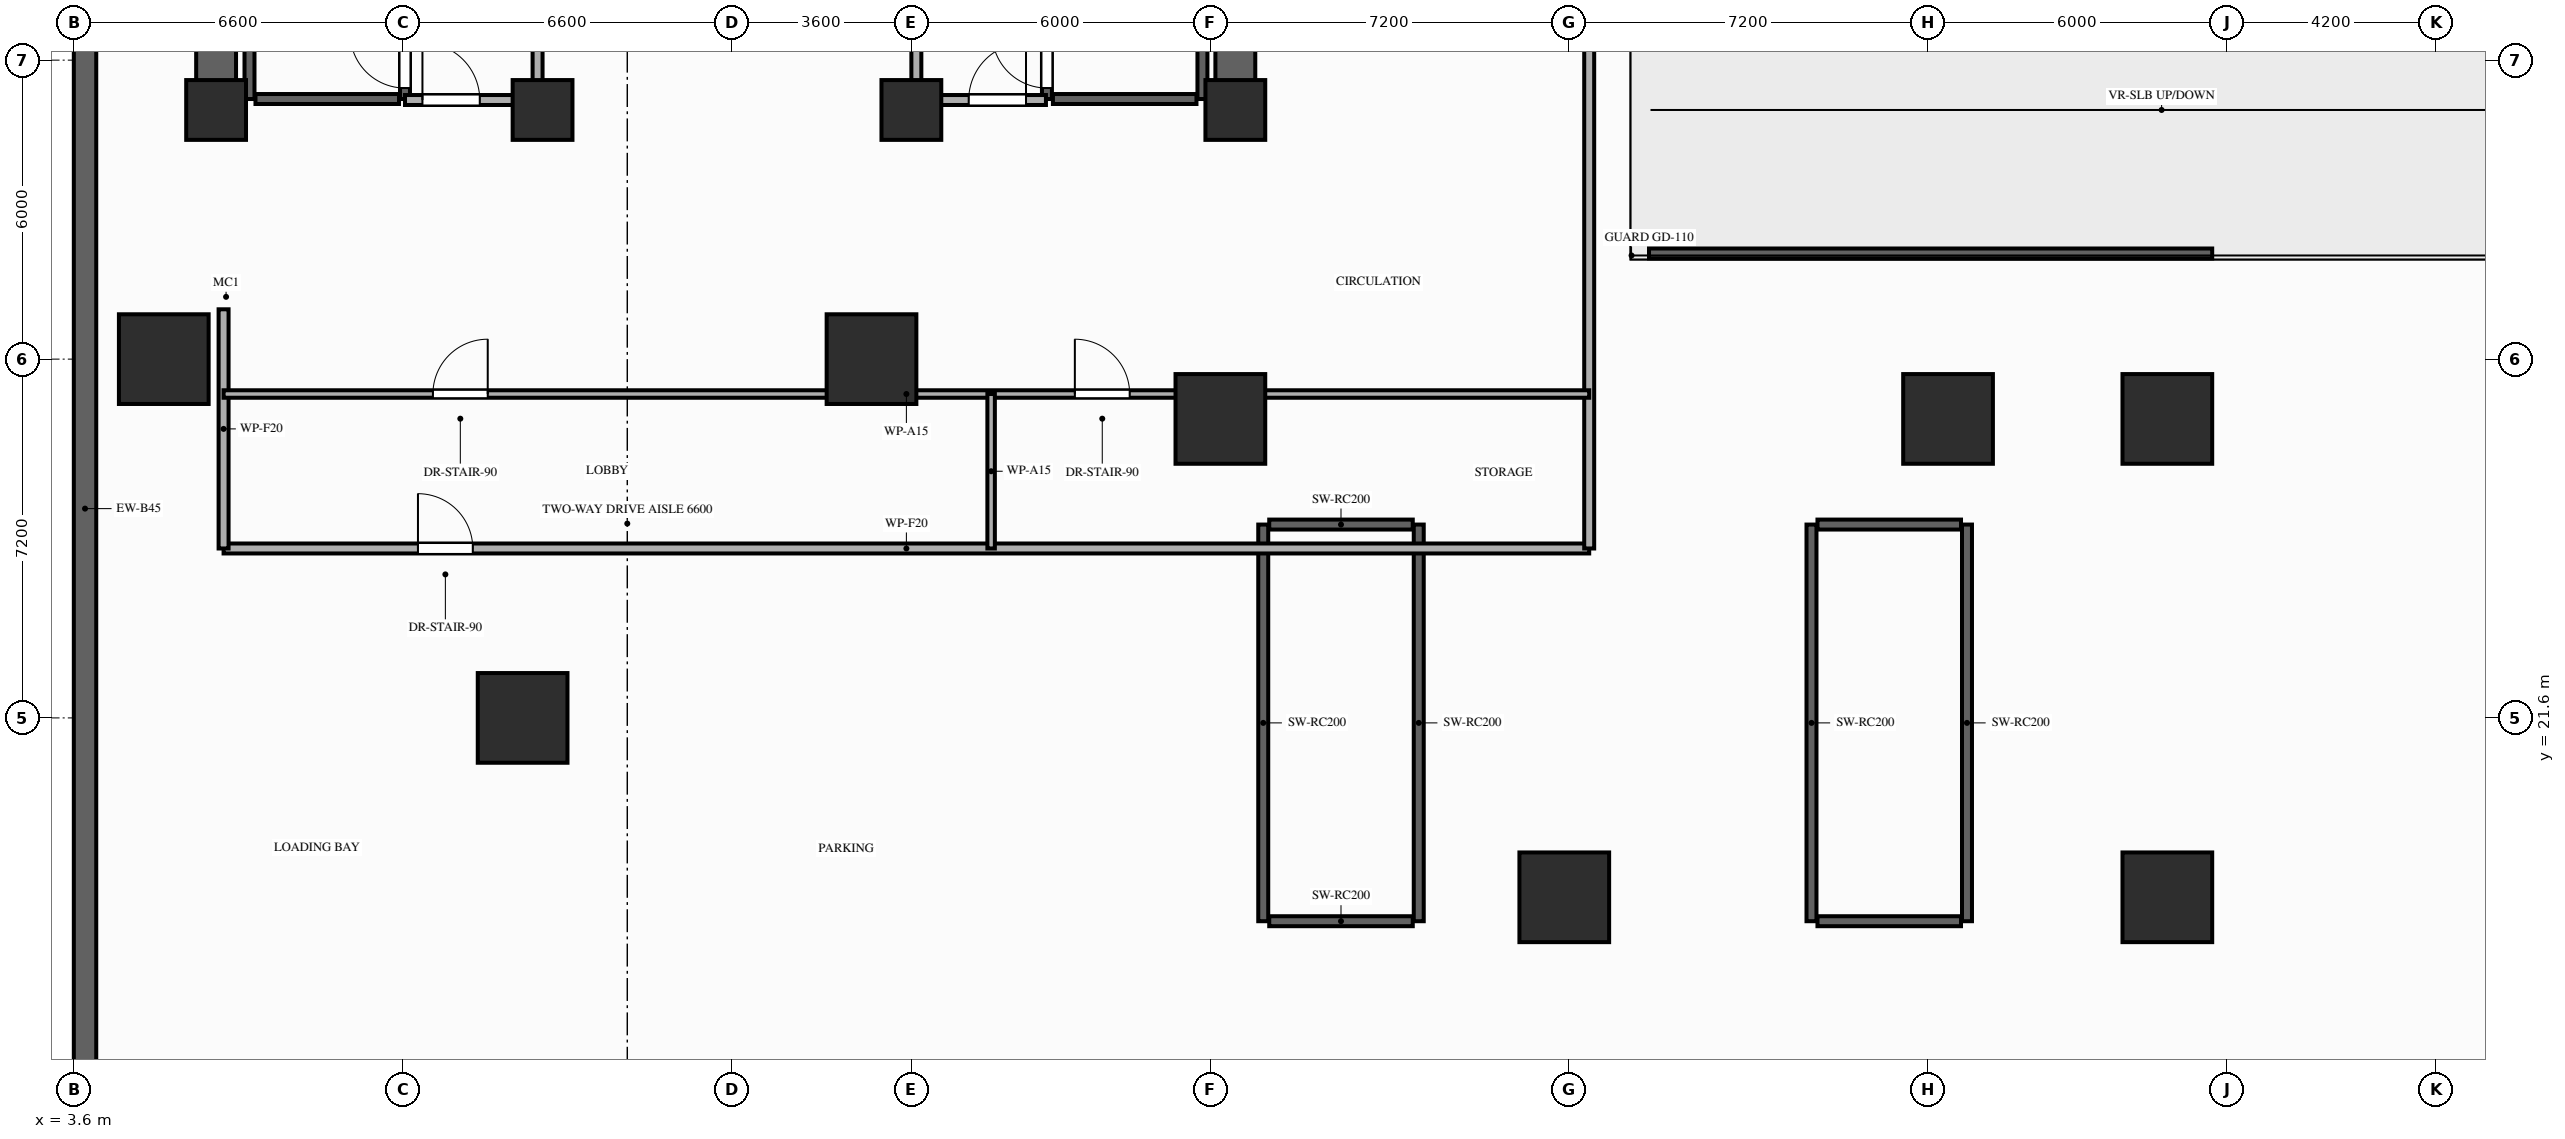
"""IFC4 building model, lengths in metres.
Left out: names, types, materials, properties, quantities, classifications, styles, units other than length and angle.
Written with IfcOpenShell. Run it as: python <this file> out.ifc"""

import sys

from ifc_helpers import new_model, si_unit, direction, frame, frame_2d, origin, origin_2d, place, context, subcontext, project, spatial, rectangle, extrude, element, fill, save


model = new_model("IFC4")
c1 = context("Model", 3, precision=1e-05, world=origin(), true_north=direction((0.0, 1.0)))
c2 = subcontext(c1, "Body", "Model", "MODEL_VIEW")
j1 = project(units=[si_unit("LENGTHUNIT", "METRE"), si_unit("PLANEANGLEUNIT", "RADIAN")], contexts=[c1])
p1 = place(None, origin())
s1 = spatial("IfcSite", under=j1, at=p1, CompositionType="ELEMENT")
p2 = place(p1, origin())
s2 = spatial("IfcBuilding", under=s1, at=p2, CompositionType="ELEMENT")
p3 = place(p2, frame((0.0, 0.0, -7.6)))
s3 = spatial("IfcBuildingStorey", under=s2, at=p3, CompositionType="ELEMENT", Elevation=-7.6)
for number, where, z_axis, x_axis in (
    (1, (6.45, 33.8, 0.0), (0.0, 0.0, 1.0), (1.0, 0.0, 0.0)),
    (2, (13.0, 33.8, 0.0), (0.0, 0.0, 1.0), (1.0, 0.0, 0.0)),
    (3, (20.4, 33.8, 0.0), (0.0, 0.0, 1.0), (1.0, 0.0, 0.0)),
    (4, (26.9, 33.8, 0.0), (0.0, 0.0, 1.0), (1.0, 0.0, 0.0)),
):
    element("IfcColumn", number, at=place(p3, frame(where, z_axis=z_axis, x_axis=x_axis)), inside=s3, PredefinedType="COLUMN", context=c2, shape_type="SweptSolid", body=[
        extrude(rectangle(XDim=1.2, YDim=1.2, at=origin_2d()), origin(), (0.0, 0.0, 1.0), 3.8),
    ])
for number, where, z_axis, x_axis in (
    (5, (5.4, 28.8, 0.0), (0.0, 0.0, 1.0), (1.0, 0.0, 0.0)),
    (6, (19.6, 28.8, 0.0), (0.0, 0.0, 1.0), (1.0, 0.0, 0.0)),
    (7, (26.6, 27.6, 0.0), (0.0, 0.0, 1.0), (1.0, 0.0, 0.0)),
    (8, (41.2, 27.6, 0.0), (0.0, 0.0, 1.0), (1.0, 0.0, 0.0)),
    (9, (45.6, 27.6, 0.0), (0.0, 0.0, 1.0), (1.0, 0.0, 0.0)),
    (10, (12.6, 21.6, 0.0), (0.0, 0.0, 1.0), (1.0, 0.0, 0.0)),
    (11, (33.5, 18.0, 0.0), (0.0, 0.0, 1.0), (1.0, 0.0, 0.0)),
    (12, (45.6, 18.0, 0.0), (0.0, 0.0, 1.0), (1.0, 0.0, 0.0)),
):
    element("IfcColumn", number, at=place(p3, frame(where, z_axis=z_axis, x_axis=x_axis)), inside=s3, PredefinedType="COLUMN", context=c2, shape_type="SweptSolid", body=[
        extrude(rectangle(XDim=1.8, YDim=1.8, at=origin_2d()), origin(), (0.0, 0.0, 1.0), 3.8),
    ])
p4 = place(p3, frame((3.82, 49.9, 0.0), z_axis=(0.0, 0.0, 1.0), x_axis=(0.0, -1.0, 0.0)))
e13 = element("IfcWall", 13, at=p4, inside=s3, PredefinedType="SOLIDWALL", context=c2, shape_type="SweptSolid", body=[
    extrude(rectangle(XDim=48.2, YDim=0.45, at=frame_2d((24.1, 0.0))), origin(), (0.0, 0.0, 1.0), 3.55),
])
for number, where, z_axis, x_axis in (
    (14, (6.45, 33.8, 0.0), (0.0, 0.0, 1.0), (0.0, 1.0, 0.0)),
    (15, (26.9, 33.8, 0.0), (0.0, 0.0, 1.0), (0.0, 1.0, 0.0)),
):
    element("IfcWall", number, at=place(p3, frame(where, z_axis=z_axis, x_axis=x_axis)), inside=s3, PredefinedType="SHEAR", context=c2, shape_type="SweptSolid", body=[
        extrude(rectangle(XDim=7.95, YDim=0.8, at=frame_2d((3.975, 0.0))), origin(), (0.0, 0.0, 1.0), 3.55),
    ])
p5 = place(p3, frame((7.12, 34.02, 0.0), z_axis=(0.0, 0.0, 1.0), x_axis=(0.0, 1.0, 0.0)))
e16 = element("IfcWall", 16, at=p5, inside=s3, PredefinedType="SHEAR", context=c2, shape_type="SweptSolid", body=[
    extrude(rectangle(XDim=7.78, YDim=0.2, at=frame_2d((3.89, 0.0))), origin(), (0.0, 0.0, 1.0), 3.55),
])
p6 = place(p3, frame((10.24, 34.02, 0.0), z_axis=(0.0, 0.0, 1.0), x_axis=(0.0, 1.0, 0.0)))
e17 = element("IfcWall", 17, at=p6, inside=s3, PredefinedType="SHEAR", context=c2, shape_type="SweptSolid", body=[
    extrude(rectangle(XDim=7.78, YDim=0.2, at=frame_2d((3.89, 0.0))), origin(), (0.0, 0.0, 1.0), 3.55),
])
p7 = place(p6, frame((0.22, 0.0, 0.0)))
e18 = element("IfcOpeningElement", 18, at=p7, cuts=e17, PredefinedType="OPENING", context=c2, shape_type="SweptSolid", body=[
    extrude(rectangle(XDim=1.1, YDim=2.15, at=frame_2d((0.55, 1.075))), frame((0.0, 0.11, 0.0), z_axis=(0.0, -1.0, 0.0), x_axis=(1.0, 0.0, 0.0)), (0.0, 0.0, 1.0), 0.22),
])
p8 = place(p3, frame((7.24, 34.02, 0.0), z_axis=(0.0, 0.0, 1.0), x_axis=(1.0, 0.0, 0.0)))
e19 = element("IfcWall", 19, at=p8, inside=s3, PredefinedType="SHEAR", context=c2, shape_type="SweptSolid", body=[
    extrude(rectangle(XDim=2.88, YDim=0.2, at=frame_2d((1.44, 0.0))), origin(), (0.0, 0.0, 1.0), 3.55),
])
p9 = place(p3, frame((23.12, 34.02, 0.0), z_axis=(0.0, 0.0, 1.0), x_axis=(0.0, 1.0, 0.0)))
e20 = element("IfcWall", 20, at=p9, inside=s3, PredefinedType="SHEAR", context=c2, shape_type="SweptSolid", body=[
    extrude(rectangle(XDim=7.78, YDim=0.2, at=frame_2d((3.89, 0.0))), origin(), (0.0, 0.0, 1.0), 3.55),
])
p10 = place(p9, frame((0.22, 0.0, 0.0)))
e21 = element("IfcOpeningElement", 21, at=p10, cuts=e20, PredefinedType="OPENING", context=c2, shape_type="SweptSolid", body=[
    extrude(rectangle(XDim=1.1, YDim=2.15, at=frame_2d((0.55, 1.075))), frame((0.0, 0.11, 0.0), z_axis=(0.0, -1.0, 0.0), x_axis=(1.0, 0.0, 0.0)), (0.0, 0.0, 1.0), 0.22),
])
p11 = place(p3, frame((26.24, 34.02, 0.0), z_axis=(0.0, 0.0, 1.0), x_axis=(0.0, 1.0, 0.0)))
e22 = element("IfcWall", 22, at=p11, inside=s3, PredefinedType="SHEAR", context=c2, shape_type="SweptSolid", body=[
    extrude(rectangle(XDim=7.78, YDim=0.2, at=frame_2d((3.89, 0.0))), origin(), (0.0, 0.0, 1.0), 3.55),
])
p12 = place(p3, frame((23.24, 34.02, 0.0), z_axis=(0.0, 0.0, 1.0), x_axis=(1.0, 0.0, 0.0)))
e23 = element("IfcWall", 23, at=p12, inside=s3, PredefinedType="SHEAR", context=c2, shape_type="SweptSolid", body=[
    extrude(rectangle(XDim=2.88, YDim=0.2, at=frame_2d((1.44, 0.0))), origin(), (0.0, 0.0, 1.0), 3.55),
])
for number, where, z_axis, x_axis in (
    (24, (27.46, 17.52, 0.0), (0.0, 0.0, 1.0), (0.0, 1.0, 0.0)),
    (25, (30.58, 17.52, 0.0), (0.0, 0.0, 1.0), (0.0, 1.0, 0.0)),
):
    element("IfcWall", number, at=place(p3, frame(where, z_axis=z_axis, x_axis=x_axis)), inside=s3, PredefinedType="SHEAR", context=c2, shape_type="SweptSolid", body=[
        extrude(rectangle(XDim=7.96, YDim=0.2, at=frame_2d((3.98, 0.0))), origin(), (0.0, 0.0, 1.0), 3.55),
    ])
for number, where, z_axis, x_axis in (
    (26, (27.58, 25.48, 0.0), (0.0, 0.0, 1.0), (1.0, 0.0, 0.0)),
    (27, (27.58, 17.52, 0.0), (0.0, 0.0, 1.0), (1.0, 0.0, 0.0)),
):
    element("IfcWall", number, at=place(p3, frame(where, z_axis=z_axis, x_axis=x_axis)), inside=s3, PredefinedType="SHEAR", context=c2, shape_type="SweptSolid", body=[
        extrude(rectangle(XDim=2.88, YDim=0.2, at=frame_2d((1.44, 0.0))), origin(), (0.0, 0.0, 1.0), 3.55),
    ])
for number, where, z_axis, x_axis in (
    (28, (38.46, 17.52, 0.0), (0.0, 0.0, 1.0), (0.0, 1.0, 0.0)),
    (29, (41.58, 17.52, 0.0), (0.0, 0.0, 1.0), (0.0, 1.0, 0.0)),
):
    element("IfcWall", number, at=place(p3, frame(where, z_axis=z_axis, x_axis=x_axis)), inside=s3, PredefinedType="SHEAR", context=c2, shape_type="SweptSolid", body=[
        extrude(rectangle(XDim=7.96, YDim=0.2, at=frame_2d((3.98, 0.0))), origin(), (0.0, 0.0, 1.0), 3.55),
    ])
for number, where, z_axis, x_axis in (
    (30, (38.58, 25.48, 0.0), (0.0, 0.0, 1.0), (1.0, 0.0, 0.0)),
    (31, (38.58, 17.52, 0.0), (0.0, 0.0, 1.0), (1.0, 0.0, 0.0)),
):
    element("IfcWall", number, at=place(p3, frame(where, z_axis=z_axis, x_axis=x_axis)), inside=s3, PredefinedType="SHEAR", context=c2, shape_type="SweptSolid", body=[
        extrude(rectangle(XDim=2.88, YDim=0.2, at=frame_2d((1.44, 0.0))), origin(), (0.0, 0.0, 1.0), 3.55),
    ])
p13 = place(p3, frame((12.9, 34.0, 0.0), z_axis=(0.0, 0.0, 1.0), x_axis=(0.0, 1.0, 0.0)))
e32 = element("IfcWall", 32, at=p13, inside=s3, PredefinedType="PARTITIONING", context=c2, shape_type="SweptSolid", body=[
    extrude(rectangle(XDim=5.45, YDim=0.2, at=frame_2d((2.725, 0.0))), origin(), (0.0, 0.0, 1.0), 2.72),
])
p14 = place(p3, frame((10.24, 34.0, 0.0), z_axis=(0.0, 0.0, 1.0), x_axis=(1.0, 0.0, 0.0)))
e33 = element("IfcWall", 33, at=p14, inside=s3, PredefinedType="PARTITIONING", context=c2, shape_type="SweptSolid", body=[
    extrude(rectangle(XDim=2.66, YDim=0.2, at=frame_2d((1.33, 0.0))), origin(), (0.0, 0.0, 1.0), 2.72),
])
p15 = place(p14, frame((0.35, 0.0, 0.0)))
e34 = element("IfcOpeningElement", 34, at=p15, cuts=e33, PredefinedType="OPENING", context=c2, shape_type="SweptSolid", body=[
    extrude(rectangle(XDim=1.15, YDim=2.15, at=frame_2d((0.575, 1.075))), frame((0.0, 0.11, 0.0), z_axis=(0.0, -1.0, 0.0), x_axis=(1.0, 0.0, 0.0)), (0.0, 0.0, 1.0), 0.22),
])
p16 = place(p3, frame((20.5, 34.0, 0.0), z_axis=(0.0, 0.0, 1.0), x_axis=(0.0, 1.0, 0.0)))
e35 = element("IfcWall", 35, at=p16, inside=s3, PredefinedType="PARTITIONING", context=c2, shape_type="SweptSolid", body=[
    extrude(rectangle(XDim=5.45, YDim=0.2, at=frame_2d((2.725, 0.0))), origin(), (0.0, 0.0, 1.0), 2.72),
])
p17 = place(p3, frame((20.5, 34.0, 0.0), z_axis=(0.0, 0.0, 1.0), x_axis=(1.0, 0.0, 0.0)))
e36 = element("IfcWall", 36, at=p17, inside=s3, PredefinedType="PARTITIONING", context=c2, shape_type="SweptSolid", body=[
    extrude(rectangle(XDim=2.6, YDim=0.2, at=frame_2d((1.3, 0.0))), origin(), (0.0, 0.0, 1.0), 2.72),
])
p18 = place(p17, frame((1.05, 0.0, 0.0)))
e37 = element("IfcOpeningElement", 37, at=p18, cuts=e36, PredefinedType="OPENING", context=c2, shape_type="SweptSolid", body=[
    extrude(rectangle(XDim=1.15, YDim=2.15, at=frame_2d((0.575, 1.075))), frame((0.0, 0.11, 0.0), z_axis=(0.0, -1.0, 0.0), x_axis=(1.0, 0.0, 0.0)), (0.0, 0.0, 1.0), 0.22),
])
p19 = place(p3, frame((35.2, 30.92, 0.0), z_axis=(0.0, 0.0, 1.0), x_axis=(1.0, 0.0, 0.0)))
e38 = element("IfcWall", 38, at=p19, inside=s3, PredefinedType="SHEAR", context=c2, shape_type="SweptSolid", body=[
    extrude(rectangle(XDim=11.3, YDim=0.2, at=frame_2d((5.65, 0.0))), origin(), (0.0, 0.0, 1.0), 1.65),
])
p20 = place(p3, frame((6.6, 25.0, 0.0), z_axis=(0.0, 0.0, 1.0), x_axis=(1.0, 0.0, 0.0)))
e39 = element("IfcWall", 39, at=p20, inside=s3, PredefinedType="PARTITIONING", context=c2, shape_type="SweptSolid", body=[
    extrude(rectangle(XDim=27.4, YDim=0.2, at=frame_2d((13.7, 0.0))), origin(), (0.0, 0.0, 1.0), 2.72),
])
p21 = place(p20, frame((3.9, 0.0, 0.0)))
e40 = element("IfcOpeningElement", 40, at=p21, cuts=e39, PredefinedType="OPENING", context=c2, shape_type="SweptSolid", body=[
    extrude(rectangle(XDim=1.1, YDim=2.15, at=frame_2d((0.55, 1.075))), frame((0.0, 0.11, 0.0), z_axis=(0.0, -1.0, 0.0), x_axis=(1.0, 0.0, 0.0)), (0.0, 0.0, 1.0), 0.22),
])
p22 = place(p3, frame((6.6, 25.0, 0.0), z_axis=(0.0, 0.0, 1.0), x_axis=(0.0, 1.0, 0.0)))
e41 = element("IfcWall", 41, at=p22, inside=s3, PredefinedType="PARTITIONING", context=c2, shape_type="SweptSolid", body=[
    extrude(rectangle(XDim=4.8, YDim=0.2, at=frame_2d((2.4, 0.0))), origin(), (0.0, 0.0, 1.0), 2.72),
])
p23 = place(p3, frame((34.0, 25.0, 0.0), z_axis=(0.0, 0.0, 1.0), x_axis=(0.0, 1.0, 0.0)))
e42 = element("IfcWall", 42, at=p23, inside=s3, PredefinedType="PARTITIONING", context=c2, shape_type="SweptSolid", body=[
    extrude(rectangle(XDim=24.9, YDim=0.2, at=frame_2d((12.45, 0.0))), origin(), (0.0, 0.0, 1.0), 2.72),
])
p24 = place(p3, frame((6.6, 28.1, 0.0), z_axis=(0.0, 0.0, 1.0), x_axis=(1.0, 0.0, 0.0)))
e43 = element("IfcWall", 43, at=p24, inside=s3, PredefinedType="PARTITIONING", context=c2, shape_type="SweptSolid", body=[
    extrude(rectangle(XDim=27.4, YDim=0.15, at=frame_2d((13.7, 0.0))), origin(), (0.0, 0.0, 1.0), 2.72),
])
p25 = place(p24, frame((4.2, 0.0, 0.0)))
e44 = element("IfcOpeningElement", 44, at=p25, cuts=e43, PredefinedType="OPENING", context=c2, shape_type="SweptSolid", body=[
    extrude(rectangle(XDim=1.1, YDim=2.15, at=frame_2d((0.55, 1.075))), frame((0.0, 0.085, 0.0), z_axis=(0.0, -1.0, 0.0), x_axis=(1.0, 0.0, 0.0)), (0.0, 0.0, 1.0), 0.17),
])
p26 = place(p24, frame((17.08, 0.0, 0.0)))
e45 = element("IfcOpeningElement", 45, at=p26, cuts=e43, PredefinedType="OPENING", context=c2, shape_type="SweptSolid", body=[
    extrude(rectangle(XDim=1.1, YDim=2.15, at=frame_2d((0.55, 1.075))), frame((0.0, 0.085, 0.0), z_axis=(0.0, -1.0, 0.0), x_axis=(1.0, 0.0, 0.0)), (0.0, 0.0, 1.0), 0.17),
])
p27 = place(p3, frame((22.0, 25.0, 0.0), z_axis=(0.0, 0.0, 1.0), x_axis=(0.0, 1.0, 0.0)))
e46 = element("IfcWall", 46, at=p27, inside=s3, PredefinedType="PARTITIONING", context=c2, shape_type="SweptSolid", body=[
    extrude(rectangle(XDim=3.1, YDim=0.15, at=frame_2d((1.55, 0.0))), origin(), (0.0, 0.0, 1.0), 3.55),
])
p28 = place(p7, origin())
e47 = element("IfcDoor", 47, at=p28, inside=s3, OperationType="SINGLE_SWING_RIGHT", PredefinedType="DOOR", context=c2, shape_type="SweptSolid", body=[
    extrude(rectangle(XDim=1.1, YDim=2.15, at=frame_2d((0.55, 1.075))), frame((0.0, 0.025, 0.0), z_axis=(0.0, -1.0, 0.0), x_axis=(1.0, 0.0, 0.0)), (0.0, 0.0, 1.0), 0.05),
])
fill(e18, e47)
p29 = place(p10, origin())
e48 = element("IfcDoor", 48, at=p29, inside=s3, OperationType="SINGLE_SWING_RIGHT", PredefinedType="DOOR", context=c2, shape_type="SweptSolid", body=[
    extrude(rectangle(XDim=1.1, YDim=2.15, at=frame_2d((0.55, 1.075))), frame((0.0, 0.025, 0.0), z_axis=(0.0, -1.0, 0.0), x_axis=(1.0, 0.0, 0.0)), (0.0, 0.0, 1.0), 0.05),
])
fill(e21, e48)
p30 = place(p15, origin())
e49 = element("IfcDoor", 49, at=p30, inside=s3, OperationType="SINGLE_SWING_LEFT", PredefinedType="DOOR", context=c2, shape_type="SweptSolid", body=[
    extrude(rectangle(XDim=1.15, YDim=2.15, at=frame_2d((0.575, 1.075))), frame((0.0, 0.025, 0.0), z_axis=(0.0, -1.0, 0.0), x_axis=(1.0, 0.0, 0.0)), (0.0, 0.0, 1.0), 0.05),
])
fill(e34, e49)
p31 = place(p18, origin())
e50 = element("IfcDoor", 50, at=p31, inside=s3, OperationType="SINGLE_SWING_RIGHT", PredefinedType="DOOR", context=c2, shape_type="SweptSolid", body=[
    extrude(rectangle(XDim=1.15, YDim=2.15, at=frame_2d((0.575, 1.075))), frame((0.0, 0.025, 0.0), z_axis=(0.0, -1.0, 0.0), x_axis=(1.0, 0.0, 0.0)), (0.0, 0.0, 1.0), 0.05),
])
fill(e37, e50)
p32 = place(p21, origin())
e51 = element("IfcDoor", 51, at=p32, inside=s3, OperationType="SINGLE_SWING_LEFT", PredefinedType="DOOR", context=c2, shape_type="SweptSolid", body=[
    extrude(rectangle(XDim=1.1, YDim=2.15, at=frame_2d((0.55, 1.075))), frame((0.0, 0.025, 0.0), z_axis=(0.0, -1.0, 0.0), x_axis=(1.0, 0.0, 0.0)), (0.0, 0.0, 1.0), 0.05),
])
fill(e40, e51)
p33 = place(p25, origin())
e52 = element("IfcDoor", 52, at=p33, inside=s3, OperationType="SINGLE_SWING_RIGHT", PredefinedType="DOOR", context=c2, shape_type="SweptSolid", body=[
    extrude(rectangle(XDim=1.1, YDim=2.15, at=frame_2d((0.55, 1.075))), frame((0.0, 0.025, 0.0), z_axis=(0.0, -1.0, 0.0), x_axis=(1.0, 0.0, 0.0)), (0.0, 0.0, 1.0), 0.05),
])
fill(e44, e52)
p34 = place(p26, origin())
e53 = element("IfcDoor", 53, at=p34, inside=s3, OperationType="SINGLE_SWING_LEFT", PredefinedType="DOOR", context=c2, shape_type="SweptSolid", body=[
    extrude(rectangle(XDim=1.1, YDim=2.15, at=frame_2d((0.55, 1.075))), frame((0.0, 0.025, 0.0), z_axis=(0.0, -1.0, 0.0), x_axis=(1.0, 0.0, 0.0)), (0.0, 0.0, 1.0), 0.05),
])
fill(e45, e53)
save(model, sys.argv[1])
